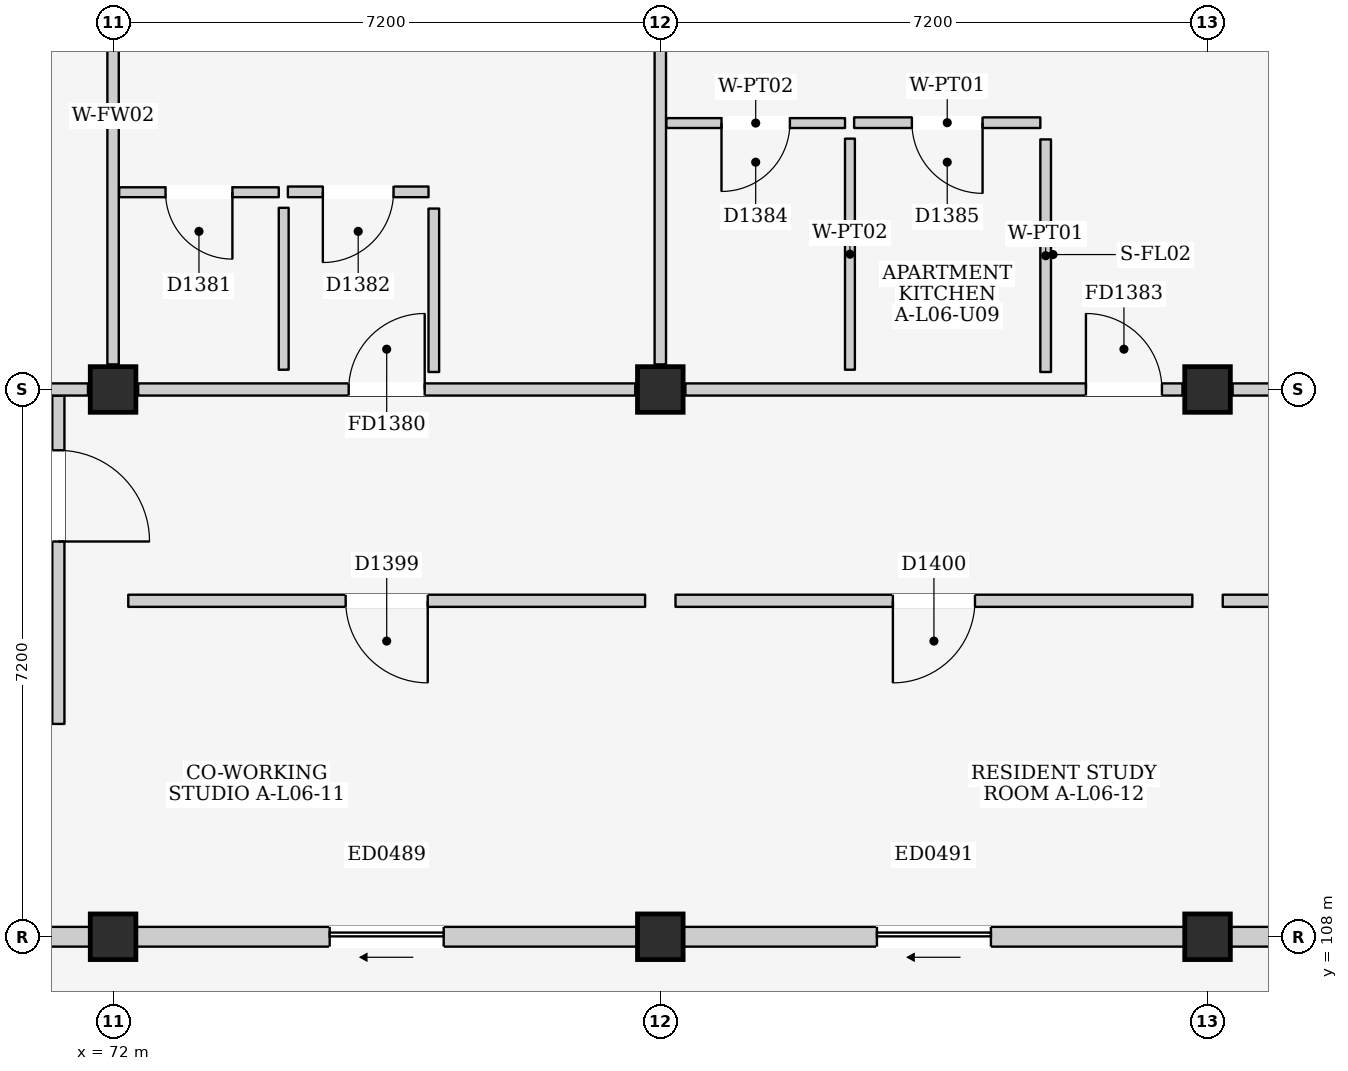
"""IFC4 building model, lengths in metres.
Left out: names, types, materials, properties, quantities, classifications, styles, units other than length and angle.
Written with IfcOpenShell. Run it as: python <this file> out.ifc"""

import sys

from ifc_helpers import new_model, si_unit, direction, frame, frame_2d, origin, origin_2d, place, context, subcontext, project, spatial, rectangle, extrude, element, fill, save


model = new_model("IFC4")
c1 = context("Model", 3, precision=1e-05, world=origin(), true_north=direction((0.0, 1.0)))
c2 = subcontext(c1, "Body", "Model", "MODEL_VIEW")
j1 = project(units=[si_unit("LENGTHUNIT", "METRE"), si_unit("PLANEANGLEUNIT", "RADIAN")], contexts=[c1])
p1 = place(None, origin())
s1 = spatial("IfcSite", under=j1, at=p1, CompositionType="ELEMENT")
p2 = place(p1, origin())
s2 = spatial("IfcBuilding", under=s1, at=p2, CompositionType="ELEMENT")
p3 = place(p2, frame((0.0, 0.0, 21.9)))
s3 = spatial("IfcBuildingStorey", under=s2, at=p3, CompositionType="ELEMENT", Elevation=21.9)
for number, where, z_axis, x_axis in (
    (1, (72.0, 108.0, 0.0), (0.0, 0.0, 1.0), (1.0, 0.0, 0.0)),
    (2, (72.0, 115.2, 0.0), (0.0, 0.0, 1.0), (1.0, 0.0, 0.0)),
    (3, (79.2, 108.0, 0.0), (0.0, 0.0, 1.0), (1.0, 0.0, 0.0)),
    (4, (79.2, 115.2, 0.0), (0.0, 0.0, 1.0), (1.0, 0.0, 0.0)),
    (5, (86.4, 108.0, 0.0), (0.0, 0.0, 1.0), (1.0, 0.0, 0.0)),
    (6, (86.4, 115.2, 0.0), (0.0, 0.0, 1.0), (1.0, 0.0, 0.0)),
):
    element("IfcColumn", number, at=place(p3, frame(where, z_axis=z_axis, x_axis=x_axis)), inside=s3, PredefinedType="COLUMN", context=c2, shape_type="SweptSolid", body=[
        extrude(rectangle(XDim=0.6, YDim=0.6, at=origin_2d()), origin(), (0.0, 0.0, 1.0), 3.2),
    ])
p4 = place(p3, frame((65.1, 108.0, 0.0), z_axis=(0.0, 0.0, 1.0), x_axis=(1.0, 0.0, 0.0)))
e7 = element("IfcWall", 7, at=p4, inside=s3, PredefinedType="ELEMENTEDWALL", context=c2, shape_type="SweptSolid", body=[
    extrude(rectangle(XDim=6.6, YDim=0.26, at=frame_2d((3.3, 0.0))), origin(), (0.0, 0.0, 1.0), 2.315),
])
p5 = place(p4, frame((2.8, 0.0, 1.2)))
e8 = element("IfcOpeningElement", 8, at=p5, cuts=e7, PredefinedType="OPENING", context=c2, shape_type="SweptSolid", body=[
    extrude(rectangle(XDim=1.0, YDim=0.9, at=frame_2d((0.5, 0.45))), frame((0.0, 0.145, 0.0), z_axis=(0.0, -1.0, 0.0), x_axis=(1.0, 0.0, 0.0)), (0.0, 0.0, 1.0), 0.29),
])
p6 = place(p3, frame((72.3, 108.0, 0.0), z_axis=(0.0, 0.0, 1.0), x_axis=(1.0, 0.0, 0.0)))
e9 = element("IfcWall", 9, at=p6, inside=s3, PredefinedType="ELEMENTEDWALL", context=c2, shape_type="SweptSolid", body=[
    extrude(rectangle(XDim=6.6, YDim=0.26, at=frame_2d((3.3, 0.0))), origin(), (0.0, 0.0, 1.0), 2.315),
])
p7 = place(p6, frame((2.55, 0.0, 0.0)))
e10 = element("IfcOpeningElement", 10, at=p7, cuts=e9, PredefinedType="OPENING", context=c2, shape_type="SweptSolid", body=[
    extrude(rectangle(XDim=1.5, YDim=2.12, at=frame_2d((0.75, 1.06))), frame((0.0, 0.145, 0.0), z_axis=(0.0, -1.0, 0.0), x_axis=(1.0, 0.0, 0.0)), (0.0, 0.0, 1.0), 0.29),
])
p8 = place(p3, frame((79.5, 108.0, 0.0), z_axis=(0.0, 0.0, 1.0), x_axis=(1.0, 0.0, 0.0)))
e11 = element("IfcWall", 11, at=p8, inside=s3, PredefinedType="ELEMENTEDWALL", context=c2, shape_type="SweptSolid", body=[
    extrude(rectangle(XDim=6.6, YDim=0.26, at=frame_2d((3.3, 0.0))), origin(), (0.0, 0.0, 1.0), 2.315),
])
p9 = place(p8, frame((2.55, 0.0, 0.0)))
e12 = element("IfcOpeningElement", 12, at=p9, cuts=e11, PredefinedType="OPENING", context=c2, shape_type="SweptSolid", body=[
    extrude(rectangle(XDim=1.5, YDim=2.12, at=frame_2d((0.75, 1.06))), frame((0.0, 0.145, 0.0), z_axis=(0.0, -1.0, 0.0), x_axis=(1.0, 0.0, 0.0)), (0.0, 0.0, 1.0), 0.29),
])
p10 = place(p3, frame((86.7, 108.0, 0.0), z_axis=(0.0, 0.0, 1.0), x_axis=(1.0, 0.0, 0.0)))
e13 = element("IfcWall", 13, at=p10, inside=s3, PredefinedType="ELEMENTEDWALL", context=c2, shape_type="SweptSolid", body=[
    extrude(rectangle(XDim=6.6, YDim=0.26, at=frame_2d((3.3, 0.0))), origin(), (0.0, 0.0, 1.0), 2.315),
])
p11 = place(p10, frame((2.55, 0.0, 0.0)))
e14 = element("IfcOpeningElement", 14, at=p11, cuts=e13, PredefinedType="OPENING", context=c2, shape_type="SweptSolid", body=[
    extrude(rectangle(XDim=1.5, YDim=2.12, at=frame_2d((0.75, 1.06))), frame((0.0, 0.145, 0.0), z_axis=(0.0, -1.0, 0.0), x_axis=(1.0, 0.0, 0.0)), (0.0, 0.0, 1.0), 0.29),
])
p12 = place(p3, frame((71.28, 110.8, 0.0), z_axis=(0.0, 0.0, 1.0), x_axis=(0.0, 1.0, 0.0)))
e15 = element("IfcWall", 15, at=p12, inside=s3, PredefinedType="PARTITIONING", context=c2, shape_type="SweptSolid", body=[
    extrude(rectangle(XDim=4.32, YDim=0.16, at=frame_2d((2.16, 0.0))), origin(), (0.0, 0.0, 1.0), 2.98),
])
p13 = place(p12, frame((2.4, 0.0, 0.0)))
e16 = element("IfcOpeningElement", 16, at=p13, cuts=e15, PredefinedType="OPENING", context=c2, shape_type="SweptSolid", body=[
    extrude(rectangle(XDim=1.2, YDim=2.2, at=frame_2d((0.6, 1.1))), frame((0.0, 0.095, 0.0), z_axis=(0.0, -1.0, 0.0), x_axis=(1.0, 0.0, 0.0)), (0.0, 0.0, 1.0), 0.19),
])
p14 = place(p3, frame((65.13, 115.2, 0.0), z_axis=(0.0, 0.0, 1.0), x_axis=(1.0, 0.0, 0.0)))
e17 = element("IfcWall", 17, at=p14, inside=s3, PredefinedType="PARTITIONING", context=c2, shape_type="SweptSolid", body=[
    extrude(rectangle(XDim=6.54, YDim=0.16, at=frame_2d((3.27, 0.0))), origin(), (0.0, 0.0, 1.0), 2.315),
])
p15 = place(p14, frame((2.77, 0.0, 0.0)))
e18 = element("IfcOpeningElement", 18, at=p15, cuts=e17, PredefinedType="OPENING", context=c2, shape_type="SweptSolid", body=[
    extrude(rectangle(XDim=1.0, YDim=2.15, at=frame_2d((0.5, 1.075))), frame((0.0, 0.095, 0.0), z_axis=(0.0, -1.0, 0.0), x_axis=(1.0, 0.0, 0.0)), (0.0, 0.0, 1.0), 0.19),
])
p16 = place(p3, frame((72.0, 115.53, 0.0), z_axis=(0.0, 0.0, 1.0), x_axis=(0.0, 1.0, 0.0)))
e19 = element("IfcWall", 19, at=p16, inside=s3, PredefinedType="PARTITIONING", context=c2, shape_type="SweptSolid", body=[
    extrude(rectangle(XDim=6.54, YDim=0.15, at=frame_2d((3.27, 0.0))), origin(), (0.0, 0.0, 1.0), 2.465),
])
p17 = place(p3, frame((72.33, 115.2, 0.0), z_axis=(0.0, 0.0, 1.0), x_axis=(1.0, 0.0, 0.0)))
e20 = element("IfcWall", 20, at=p17, inside=s3, PredefinedType="PARTITIONING", context=c2, shape_type="SweptSolid", body=[
    extrude(rectangle(XDim=6.54, YDim=0.16, at=frame_2d((3.27, 0.0))), origin(), (0.0, 0.0, 1.0), 2.315),
])
p18 = place(p17, frame((2.77, 0.0, 0.0)))
e21 = element("IfcOpeningElement", 21, at=p18, cuts=e20, PredefinedType="OPENING", context=c2, shape_type="SweptSolid", body=[
    extrude(rectangle(XDim=1.0, YDim=2.15, at=frame_2d((0.5, 1.075))), frame((0.0, 0.095, 0.0), z_axis=(0.0, -1.0, 0.0), x_axis=(1.0, 0.0, 0.0)), (0.0, 0.0, 1.0), 0.19),
])
p19 = place(p3, frame((79.2, 115.53, 0.0), z_axis=(0.0, 0.0, 1.0), x_axis=(0.0, 1.0, 0.0)))
e22 = element("IfcWall", 22, at=p19, inside=s3, PredefinedType="PARTITIONING", context=c2, shape_type="SweptSolid", body=[
    extrude(rectangle(XDim=6.54, YDim=0.15, at=frame_2d((3.27, 0.0))), origin(), (0.0, 0.0, 1.0), 2.465),
])
p20 = place(p3, frame((72.08, 117.795, 0.0), z_axis=(0.0, 0.0, 1.0), x_axis=(1.0, 0.0, 0.0)))
e23 = element("IfcWall", 23, at=p20, inside=s3, PredefinedType="PARTITIONING", context=c2, shape_type="SweptSolid", body=[
    extrude(rectangle(XDim=2.1, YDim=0.13, at=frame_2d((1.05, 0.0))), origin(), (0.0, 0.0, 1.0), 2.98),
])
p21 = place(p20, frame((0.61, 0.0, 0.0)))
e24 = element("IfcOpeningElement", 24, at=p21, cuts=e23, PredefinedType="OPENING", context=c2, shape_type="SweptSolid", body=[
    extrude(rectangle(XDim=0.88, YDim=2.1, at=frame_2d((0.44, 1.05))), frame((0.0, 0.08, 0.0), z_axis=(0.0, -1.0, 0.0), x_axis=(1.0, 0.0, 0.0)), (0.0, 0.0, 1.0), 0.16),
])
p22 = place(p3, frame((74.245, 115.46, 0.0), z_axis=(0.0, 0.0, 1.0), x_axis=(0.0, 1.0, 0.0)))
e25 = element("IfcWall", 25, at=p22, inside=s3, PredefinedType="PARTITIONING", context=c2, shape_type="SweptSolid", body=[
    extrude(rectangle(XDim=2.13, YDim=0.13, at=frame_2d((1.065, 0.0))), origin(), (0.0, 0.0, 1.0), 2.98),
])
p23 = place(p3, frame((74.3, 117.8, 0.0), z_axis=(0.0, 0.0, 1.0), x_axis=(1.0, 0.0, 0.0)))
e26 = element("IfcWall", 26, at=p23, inside=s3, PredefinedType="PARTITIONING", context=c2, shape_type="SweptSolid", body=[
    extrude(rectangle(XDim=1.85, YDim=0.14, at=frame_2d((0.925, 0.0))), origin(), (0.0, 0.0, 1.0), 2.98),
])
p24 = place(p23, frame((0.46, 0.0, 0.0)))
e27 = element("IfcOpeningElement", 27, at=p24, cuts=e26, PredefinedType="OPENING", context=c2, shape_type="SweptSolid", body=[
    extrude(rectangle(XDim=0.93, YDim=2.14, at=frame_2d((0.465, 1.07))), frame((0.0, 0.085, 0.0), z_axis=(0.0, -1.0, 0.0), x_axis=(1.0, 0.0, 0.0)), (0.0, 0.0, 1.0), 0.17),
])
p25 = place(p3, frame((76.22, 115.43, 0.0), z_axis=(0.0, 0.0, 1.0), x_axis=(0.0, 1.0, 0.0)))
e28 = element("IfcWall", 28, at=p25, inside=s3, PredefinedType="PARTITIONING", context=c2, shape_type="SweptSolid", body=[
    extrude(rectangle(XDim=2.15, YDim=0.14, at=frame_2d((1.075, 0.0))), origin(), (0.0, 0.0, 1.0), 2.98),
])
p26 = place(p3, frame((79.53, 115.2, 0.0), z_axis=(0.0, 0.0, 1.0), x_axis=(1.0, 0.0, 0.0)))
e29 = element("IfcWall", 29, at=p26, inside=s3, PredefinedType="PARTITIONING", context=c2, shape_type="SweptSolid", body=[
    extrude(rectangle(XDim=6.54, YDim=0.16, at=frame_2d((3.27, 0.0))), origin(), (0.0, 0.0, 1.0), 2.315),
])
p27 = place(p26, frame((5.27, 0.0, 0.0)))
e30 = element("IfcOpeningElement", 30, at=p27, cuts=e29, PredefinedType="OPENING", context=c2, shape_type="SweptSolid", body=[
    extrude(rectangle(XDim=1.0, YDim=2.15, at=frame_2d((0.5, 1.075))), frame((0.0, 0.095, 0.0), z_axis=(0.0, -1.0, 0.0), x_axis=(1.0, 0.0, 0.0)), (0.0, 0.0, 1.0), 0.19),
])
p28 = place(p3, frame((86.73, 115.2, 0.0), z_axis=(0.0, 0.0, 1.0), x_axis=(1.0, 0.0, 0.0)))
e31 = element("IfcWall", 31, at=p28, inside=s3, PredefinedType="PARTITIONING", context=c2, shape_type="SweptSolid", body=[
    extrude(rectangle(XDim=6.54, YDim=0.16, at=frame_2d((3.27, 0.0))), origin(), (0.0, 0.0, 1.0), 2.315),
])
p29 = place(p3, frame((79.28, 118.705, 0.0), z_axis=(0.0, 0.0, 1.0), x_axis=(1.0, 0.0, 0.0)))
e32 = element("IfcWall", 32, at=p29, inside=s3, PredefinedType="PARTITIONING", context=c2, shape_type="SweptSolid", body=[
    extrude(rectangle(XDim=2.35, YDim=0.13, at=frame_2d((1.175, 0.0))), origin(), (0.0, 0.0, 1.0), 2.98),
])
p30 = place(p29, frame((0.725, 0.0, 0.0)))
e33 = element("IfcOpeningElement", 33, at=p30, cuts=e32, PredefinedType="OPENING", context=c2, shape_type="SweptSolid", body=[
    extrude(rectangle(XDim=0.9, YDim=2.1, at=frame_2d((0.45, 1.05))), frame((0.0, 0.08, 0.0), z_axis=(0.0, -1.0, 0.0), x_axis=(1.0, 0.0, 0.0)), (0.0, 0.0, 1.0), 0.16),
])
p31 = place(p3, frame((81.695, 115.46, 0.0), z_axis=(0.0, 0.0, 1.0), x_axis=(0.0, 1.0, 0.0)))
e34 = element("IfcWall", 34, at=p31, inside=s3, PredefinedType="PARTITIONING", context=c2, shape_type="SweptSolid", body=[
    extrude(rectangle(XDim=3.04, YDim=0.13, at=frame_2d((1.52, 0.0))), origin(), (0.0, 0.0, 1.0), 2.98),
])
p32 = place(p3, frame((81.75, 118.71, 0.0), z_axis=(0.0, 0.0, 1.0), x_axis=(1.0, 0.0, 0.0)))
e35 = element("IfcWall", 35, at=p32, inside=s3, PredefinedType="PARTITIONING", context=c2, shape_type="SweptSolid", body=[
    extrude(rectangle(XDim=2.45, YDim=0.14, at=frame_2d((1.225, 0.0))), origin(), (0.0, 0.0, 1.0), 2.98),
])
p33 = place(p32, frame((0.76, 0.0, 0.0)))
e36 = element("IfcOpeningElement", 36, at=p33, cuts=e35, PredefinedType="OPENING", context=c2, shape_type="SweptSolid", body=[
    extrude(rectangle(XDim=0.93, YDim=2.14, at=frame_2d((0.465, 1.07))), frame((0.0, 0.085, 0.0), z_axis=(0.0, -1.0, 0.0), x_axis=(1.0, 0.0, 0.0)), (0.0, 0.0, 1.0), 0.17),
])
p34 = place(p3, frame((84.27, 115.43, 0.0), z_axis=(0.0, 0.0, 1.0), x_axis=(0.0, 1.0, 0.0)))
e37 = element("IfcWall", 37, at=p34, inside=s3, PredefinedType="PARTITIONING", context=c2, shape_type="SweptSolid", body=[
    extrude(rectangle(XDim=3.06, YDim=0.14, at=frame_2d((1.53, 0.0))), origin(), (0.0, 0.0, 1.0), 2.98),
])
p35 = place(p3, frame((72.2, 112.42, 0.0), z_axis=(0.0, 0.0, 1.0), x_axis=(1.0, 0.0, 0.0)))
e38 = element("IfcWall", 38, at=p35, inside=s3, PredefinedType="PARTITIONING", context=c2, shape_type="SweptSolid", body=[
    extrude(rectangle(XDim=6.8, YDim=0.16, at=frame_2d((3.4, 0.0))), origin(), (0.0, 0.0, 1.0), 2.98),
])
p36 = place(p35, frame((2.86, 0.0, 0.0)))
e39 = element("IfcOpeningElement", 39, at=p36, cuts=e38, PredefinedType="OPENING", context=c2, shape_type="SweptSolid", body=[
    extrude(rectangle(XDim=1.08, YDim=2.22, at=frame_2d((0.54, 1.11))), frame((0.0, 0.095, 0.0), z_axis=(0.0, -1.0, 0.0), x_axis=(1.0, 0.0, 0.0)), (0.0, 0.0, 1.0), 0.19),
])
p37 = place(p3, frame((79.4, 112.42, 0.0), z_axis=(0.0, 0.0, 1.0), x_axis=(1.0, 0.0, 0.0)))
e40 = element("IfcWall", 40, at=p37, inside=s3, PredefinedType="PARTITIONING", context=c2, shape_type="SweptSolid", body=[
    extrude(rectangle(XDim=6.8, YDim=0.16, at=frame_2d((3.4, 0.0))), origin(), (0.0, 0.0, 1.0), 2.98),
])
p38 = place(p37, frame((2.86, 0.0, 0.0)))
e41 = element("IfcOpeningElement", 41, at=p38, cuts=e40, PredefinedType="OPENING", context=c2, shape_type="SweptSolid", body=[
    extrude(rectangle(XDim=1.08, YDim=2.22, at=frame_2d((0.54, 1.11))), frame((0.0, 0.095, 0.0), z_axis=(0.0, -1.0, 0.0), x_axis=(1.0, 0.0, 0.0)), (0.0, 0.0, 1.0), 0.19),
])
p39 = place(p3, frame((86.6, 112.42, 0.0), z_axis=(0.0, 0.0, 1.0), x_axis=(1.0, 0.0, 0.0)))
e42 = element("IfcWall", 42, at=p39, inside=s3, PredefinedType="PARTITIONING", context=c2, shape_type="SweptSolid", body=[
    extrude(rectangle(XDim=6.8, YDim=0.16, at=frame_2d((3.4, 0.0))), origin(), (0.0, 0.0, 1.0), 2.98),
])
p40 = place(p39, frame((2.86, 0.0, 0.0)))
e43 = element("IfcOpeningElement", 43, at=p40, cuts=e42, PredefinedType="OPENING", context=c2, shape_type="SweptSolid", body=[
    extrude(rectangle(XDim=1.08, YDim=2.22, at=frame_2d((0.54, 1.11))), frame((0.0, 0.095, 0.0), z_axis=(0.0, -1.0, 0.0), x_axis=(1.0, 0.0, 0.0)), (0.0, 0.0, 1.0), 0.19),
])
p41 = place(p7, frame((1.5, 0.0, 0.0), z_axis=(0.0, 0.0, 1.0), x_axis=(-1.0, 0.0, 0.0)))
e44 = element("IfcDoor", 44, at=p41, inside=s3, OperationType="SLIDING_TO_LEFT", PredefinedType="DOOR", context=c2, shape_type="SweptSolid", body=[
    extrude(rectangle(XDim=1.5, YDim=2.12, at=frame_2d((0.75, 1.06))), frame((0.0, 0.025, 0.0), z_axis=(0.0, -1.0, 0.0), x_axis=(1.0, 0.0, 0.0)), (0.0, 0.0, 1.0), 0.05),
])
fill(e10, e44)
p42 = place(p9, frame((1.5, 0.0, 0.0), z_axis=(0.0, 0.0, 1.0), x_axis=(-1.0, 0.0, 0.0)))
e45 = element("IfcDoor", 45, at=p42, inside=s3, OperationType="SLIDING_TO_LEFT", PredefinedType="DOOR", context=c2, shape_type="SweptSolid", body=[
    extrude(rectangle(XDim=1.5, YDim=2.12, at=frame_2d((0.75, 1.06))), frame((0.0, 0.025, 0.0), z_axis=(0.0, -1.0, 0.0), x_axis=(1.0, 0.0, 0.0)), (0.0, 0.0, 1.0), 0.05),
])
fill(e12, e45)
p43 = place(p13, frame((1.2, 0.0, 0.0), z_axis=(0.0, 0.0, 1.0), x_axis=(-1.0, 0.0, 0.0)))
e46 = element("IfcDoor", 46, at=p43, inside=s3, OperationType="SINGLE_SWING_RIGHT", PredefinedType="DOOR", context=c2, shape_type="SweptSolid", body=[
    extrude(rectangle(XDim=1.2, YDim=2.2, at=frame_2d((0.6, 1.1))), frame((0.0, 0.025, 0.0), z_axis=(0.0, -1.0, 0.0), x_axis=(1.0, 0.0, 0.0)), (0.0, 0.0, 1.0), 0.05),
])
fill(e16, e46)
p44 = place(p18, origin())
e47 = element("IfcDoor", 47, at=p44, inside=s3, OperationType="SINGLE_SWING_RIGHT", PredefinedType="DOOR", context=c2, shape_type="SweptSolid", body=[
    extrude(rectangle(XDim=1.0, YDim=2.15, at=frame_2d((0.5, 1.075))), frame((0.0, 0.025, 0.0), z_axis=(0.0, -1.0, 0.0), x_axis=(1.0, 0.0, 0.0)), (0.0, 0.0, 1.0), 0.05),
])
fill(e21, e47)
p45 = place(p21, frame((0.88, 0.0, 0.0), z_axis=(0.0, 0.0, 1.0), x_axis=(-1.0, 0.0, 0.0)))
e48 = element("IfcDoor", 48, at=p45, inside=s3, OperationType="SINGLE_SWING_LEFT", PredefinedType="DOOR", context=c2, shape_type="SweptSolid", body=[
    extrude(rectangle(XDim=0.88, YDim=2.1, at=frame_2d((0.44, 1.05))), frame((0.0, 0.025, 0.0), z_axis=(0.0, -1.0, 0.0), x_axis=(1.0, 0.0, 0.0)), (0.0, 0.0, 1.0), 0.05),
])
fill(e24, e48)
p46 = place(p24, frame((0.93, 0.0, 0.0), z_axis=(0.0, 0.0, 1.0), x_axis=(-1.0, 0.0, 0.0)))
e49 = element("IfcDoor", 49, at=p46, inside=s3, OperationType="SINGLE_SWING_RIGHT", PredefinedType="DOOR", context=c2, shape_type="SweptSolid", body=[
    extrude(rectangle(XDim=0.93, YDim=2.14, at=frame_2d((0.465, 1.07))), frame((0.0, 0.025, 0.0), z_axis=(0.0, -1.0, 0.0), x_axis=(1.0, 0.0, 0.0)), (0.0, 0.0, 1.0), 0.05),
])
fill(e27, e49)
p47 = place(p27, origin())
e50 = element("IfcDoor", 50, at=p47, inside=s3, OperationType="SINGLE_SWING_LEFT", PredefinedType="DOOR", context=c2, shape_type="SweptSolid", body=[
    extrude(rectangle(XDim=1.0, YDim=2.15, at=frame_2d((0.5, 1.075))), frame((0.0, 0.025, 0.0), z_axis=(0.0, -1.0, 0.0), x_axis=(1.0, 0.0, 0.0)), (0.0, 0.0, 1.0), 0.05),
])
fill(e30, e50)
p48 = place(p30, frame((0.9, 0.0, 0.0), z_axis=(0.0, 0.0, 1.0), x_axis=(-1.0, 0.0, 0.0)))
e51 = element("IfcDoor", 51, at=p48, inside=s3, OperationType="SINGLE_SWING_RIGHT", PredefinedType="DOOR", context=c2, shape_type="SweptSolid", body=[
    extrude(rectangle(XDim=0.9, YDim=2.1, at=frame_2d((0.45, 1.05))), frame((0.0, 0.025, 0.0), z_axis=(0.0, -1.0, 0.0), x_axis=(1.0, 0.0, 0.0)), (0.0, 0.0, 1.0), 0.05),
])
fill(e33, e51)
p49 = place(p33, frame((0.93, 0.0, 0.0), z_axis=(0.0, 0.0, 1.0), x_axis=(-1.0, 0.0, 0.0)))
e52 = element("IfcDoor", 52, at=p49, inside=s3, OperationType="SINGLE_SWING_LEFT", PredefinedType="DOOR", context=c2, shape_type="SweptSolid", body=[
    extrude(rectangle(XDim=0.93, YDim=2.14, at=frame_2d((0.465, 1.07))), frame((0.0, 0.025, 0.0), z_axis=(0.0, -1.0, 0.0), x_axis=(1.0, 0.0, 0.0)), (0.0, 0.0, 1.0), 0.05),
])
fill(e36, e52)
p50 = place(p36, frame((1.08, 0.0, 0.0), z_axis=(0.0, 0.0, 1.0), x_axis=(-1.0, 0.0, 0.0)))
e53 = element("IfcDoor", 53, at=p50, inside=s3, OperationType="SINGLE_SWING_LEFT", PredefinedType="DOOR", context=c2, shape_type="SweptSolid", body=[
    extrude(rectangle(XDim=1.08, YDim=2.22, at=frame_2d((0.54, 1.11))), frame((0.0, 0.025, 0.0), z_axis=(0.0, -1.0, 0.0), x_axis=(1.0, 0.0, 0.0)), (0.0, 0.0, 1.0), 0.05),
])
fill(e39, e53)
p51 = place(p38, frame((1.08, 0.0, 0.0), z_axis=(0.0, 0.0, 1.0), x_axis=(-1.0, 0.0, 0.0)))
e54 = element("IfcDoor", 54, at=p51, inside=s3, OperationType="SINGLE_SWING_RIGHT", PredefinedType="DOOR", context=c2, shape_type="SweptSolid", body=[
    extrude(rectangle(XDim=1.08, YDim=2.22, at=frame_2d((0.54, 1.11))), frame((0.0, 0.025, 0.0), z_axis=(0.0, -1.0, 0.0), x_axis=(1.0, 0.0, 0.0)), (0.0, 0.0, 1.0), 0.05),
])
fill(e41, e54)
save(model, sys.argv[1])
